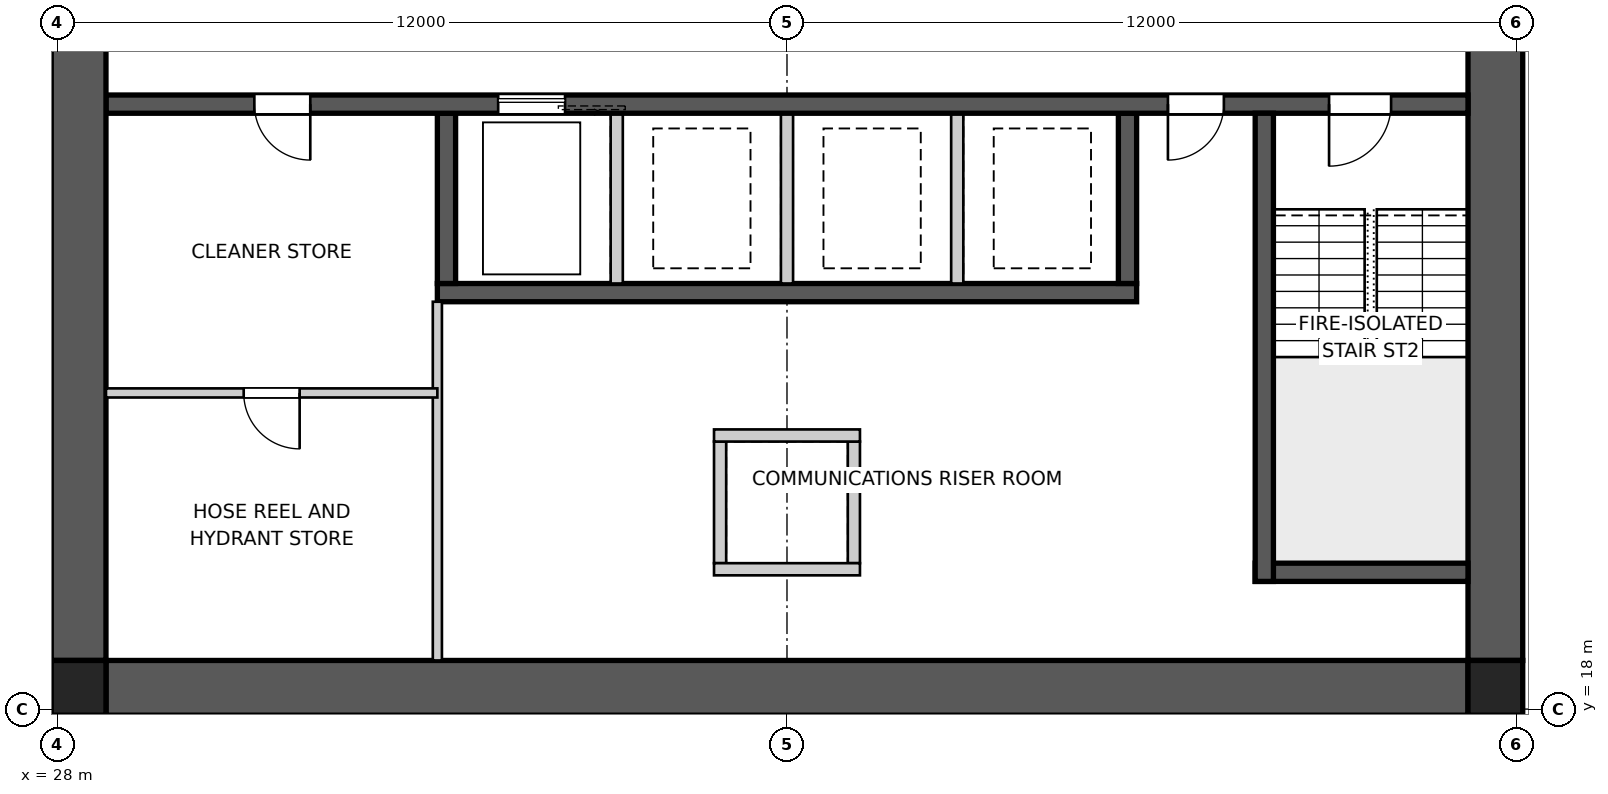
"""IFC4 building model, lengths in metres.
Left out: names, types, materials, properties, quantities, classifications, styles, units other than length and angle.
Written with IfcOpenShell. Run it as: python <this file> out.ifc"""

import sys

from ifc_helpers import new_model, si_unit, direction, frame, frame_2d, origin, origin_2d, place, context, subcontext, project, spatial, polyline, rectangle, outline, extrude, element, fill, save


model = new_model("IFC4")
c1 = context("Model", 3, precision=1e-05, world=origin(), true_north=direction((0.0, 1.0)))
c2 = subcontext(c1, "Body", "Model", "MODEL_VIEW")
j1 = project(units=[si_unit("LENGTHUNIT", "METRE"), si_unit("PLANEANGLEUNIT", "RADIAN")], contexts=[c1])
p1 = place(None, origin())
s1 = spatial("IfcSite", under=j1, at=p1, CompositionType="ELEMENT")
p2 = place(p1, origin())
s2 = spatial("IfcBuilding", under=s1, at=p2, CompositionType="ELEMENT")
p3 = place(p2, frame((0.0, 0.0, 67.6)))
s3 = spatial("IfcBuildingStorey", under=s2, at=p3, CompositionType="ELEMENT", Elevation=67.6)
p4 = place(p3, frame((51.2, 18.35, 0.0), z_axis=(0.0, 0.0, 1.0), x_axis=(-1.0, 0.0, 0.0)))
e1 = element("IfcWall", 1, at=p4, inside=s3, PredefinedType="SHEAR", context=c2, shape_type="SweptSolid", body=[
    extrude(outline(polyline([(0.0, -0.45), (22.4, -0.45), (22.4, -0.025), (22.85, -0.025), (22.85, 0.025), (22.4, 0.025), (22.4, 0.45), (0.0, 0.45), (0.0, 0.025), (-0.45, 0.025), (-0.45, -0.025), (0.0, -0.025), (0.0, -0.45)])), origin(), (0.0, 0.0, 1.0), 3.4),
])
p5 = place(p3, frame((51.65, 18.8, 0.0), z_axis=(0.0, 0.0, 1.0), x_axis=(0.0, 1.0, 0.0)))
e2 = element("IfcWall", 2, at=p5, inside=s3, PredefinedType="SHEAR", context=c2, shape_type="SweptSolid", body=[
    extrude(outline(polyline([(0.0, -0.45), (22.4, -0.45), (22.4, -0.025), (22.85, -0.025), (22.85, 0.025), (22.4, 0.025), (22.4, 0.45), (0.0, 0.45), (0.0, 0.025), (-0.45, 0.025), (-0.45, -0.025), (0.0, -0.025), (0.0, -0.45)])), origin(), (0.0, 0.0, 1.0), 3.4),
])
p6 = place(p5, frame((11.14, 0.0, 0.0)))
e3 = element("IfcOpeningElement", 3, at=p6, cuts=e2, PredefinedType="OPENING", context=c2, shape_type="SweptSolid", body=[
    extrude(rectangle(XDim=1.02, YDim=2.4, at=frame_2d((0.51, 1.2))), frame((0.0, 0.46, 0.0), z_axis=(0.0, -1.0, 0.0), x_axis=(1.0, 0.0, 0.0)), (0.0, 0.0, 1.0), 0.92),
])
p7 = place(p3, frame((28.35, 41.2, 0.0), z_axis=(0.0, 0.0, 1.0), x_axis=(0.0, -1.0, 0.0)))
e4 = element("IfcWall", 4, at=p7, inside=s3, PredefinedType="SHEAR", context=c2, shape_type="SweptSolid", body=[
    extrude(outline(polyline([(0.0, -0.45), (22.4, -0.45), (22.4, -0.025), (22.85, -0.025), (22.85, 0.025), (22.4, 0.025), (22.4, 0.45), (0.0, 0.45), (0.0, 0.025), (-0.45, 0.025), (-0.45, -0.025), (0.0, -0.025), (0.0, -0.45)])), origin(), (0.0, 0.0, 1.0), 3.4),
])
p8 = place(p7, frame((11.14, 0.0, 0.0)))
e5 = element("IfcOpeningElement", 5, at=p8, cuts=e4, PredefinedType="OPENING", context=c2, shape_type="SweptSolid", body=[
    extrude(rectangle(XDim=1.02, YDim=2.4, at=frame_2d((0.51, 1.2))), frame((0.0, 0.46, 0.0), z_axis=(0.0, -1.0, 0.0), x_axis=(1.0, 0.0, 0.0)), (0.0, 0.0, 1.0), 0.92),
])
p9 = place(p3, frame((51.2, 27.95, 0.0), z_axis=(0.0, 0.0, 1.0), x_axis=(-1.0, 0.0, 0.0)))
e6 = element("IfcWall", 6, at=p9, inside=s3, PredefinedType="SHEAR", context=c2, shape_type="SweptSolid", body=[
    extrude(rectangle(XDim=22.4, YDim=0.3, at=frame_2d((11.2, 0.0))), origin(), (0.0, 0.0, 1.0), 3.4),
])
p10 = place(p9, frame((19.04, 0.0, 0.0)))
e7 = element("IfcOpeningElement", 7, at=p10, cuts=e6, PredefinedType="OPENING", context=c2, shape_type="SweptSolid", body=[
    extrude(rectangle(XDim=0.92, YDim=2.1, at=frame_2d((0.46, 1.05))), frame((0.0, 0.16, 0.0), z_axis=(0.0, -1.0, 0.0), x_axis=(1.0, 0.0, 0.0)), (0.0, 0.0, 1.0), 0.32),
])
p11 = place(p9, frame((1.265, 0.0, 0.0)))
e8 = element("IfcOpeningElement", 8, at=p11, cuts=e6, PredefinedType="OPENING", context=c2, shape_type="SweptSolid", body=[
    extrude(rectangle(XDim=1.02, YDim=2.1, at=frame_2d((0.51, 1.05))), frame((0.0, 0.16, 0.0), z_axis=(0.0, -1.0, 0.0), x_axis=(1.0, 0.0, 0.0)), (0.0, 0.0, 1.0), 0.32),
])
p12 = place(p9, frame((4.015, 0.0, 0.0)))
e9 = element("IfcOpeningElement", 9, at=p12, cuts=e6, PredefinedType="OPENING", context=c2, shape_type="SweptSolid", body=[
    extrude(rectangle(XDim=0.92, YDim=2.1, at=frame_2d((0.46, 1.05))), frame((0.0, 0.16, 0.0), z_axis=(0.0, -1.0, 0.0), x_axis=(1.0, 0.0, 0.0)), (0.0, 0.0, 1.0), 0.32),
])
p13 = place(p9, frame((14.85, 0.0, 0.0)))
e10 = element("IfcOpeningElement", 10, at=p13, cuts=e6, PredefinedType="OPENING", context=c2, shape_type="SweptSolid", body=[
    extrude(rectangle(XDim=1.1, YDim=2.1, at=frame_2d((0.55, 1.05))), frame((0.0, 0.16, 0.0), z_axis=(0.0, -1.0, 0.0), x_axis=(1.0, 0.0, 0.0)), (0.0, 0.0, 1.0), 0.32),
])
p14 = place(p3, frame((45.75, 24.85, 0.0), z_axis=(0.0, 0.0, 1.0), x_axis=(-1.0, 0.0, 0.0)))
e11 = element("IfcWall", 11, at=p14, inside=s3, PredefinedType="SHEAR", context=c2, shape_type="SweptSolid", body=[
    extrude(rectangle(XDim=11.5, YDim=0.3, at=frame_2d((5.75, 0.0))), origin(), (0.0, 0.0, 1.0), 3.4),
])
p15 = place(p3, frame((45.6, 27.8, 0.0), z_axis=(0.0, 0.0, 1.0), x_axis=(0.0, -1.0, 0.0)))
e12 = element("IfcWall", 12, at=p15, inside=s3, PredefinedType="SHEAR", context=c2, shape_type="SweptSolid", body=[
    extrude(rectangle(XDim=2.8, YDim=0.3, at=frame_2d((1.4, 0.0))), origin(), (0.0, 0.0, 1.0), 3.4),
])
for number, where, z_axis, x_axis in (
    (13, (42.8, 27.8, 0.0), (0.0, 0.0, 1.0), (0.0, -1.0, 0.0)),
    (14, (40.0, 27.8, 0.0), (0.0, 0.0, 1.0), (0.0, -1.0, 0.0)),
    (15, (37.2, 27.8, 0.0), (0.0, 0.0, 1.0), (0.0, -1.0, 0.0)),
):
    element("IfcWall", number, at=place(p3, frame(where, z_axis=z_axis, x_axis=x_axis)), inside=s3, PredefinedType="SOLIDWALL", context=c2, shape_type="SweptSolid", body=[
        extrude(rectangle(XDim=2.8, YDim=0.2, at=frame_2d((1.4, 0.0))), origin(), (0.0, 0.0, 1.0), 3.4),
    ])
p16 = place(p3, frame((34.4, 27.8, 0.0), z_axis=(0.0, 0.0, 1.0), x_axis=(0.0, -1.0, 0.0)))
e16 = element("IfcWall", 16, at=p16, inside=s3, PredefinedType="SHEAR", context=c2, shape_type="SweptSolid", body=[
    extrude(rectangle(XDim=2.8, YDim=0.3, at=frame_2d((1.4, 0.0))), origin(), (0.0, 0.0, 1.0), 3.4),
])
p17 = place(p3, frame((47.85, 27.8, 0.0), z_axis=(0.0, 0.0, 1.0), x_axis=(0.0, -1.0, 0.0)))
e17 = element("IfcWall", 17, at=p17, inside=s3, PredefinedType="SHEAR", context=c2, shape_type="SweptSolid", body=[
    extrude(rectangle(XDim=7.7, YDim=0.3, at=frame_2d((3.85, 0.0))), origin(), (0.0, 0.0, 1.0), 3.4),
])
p18 = place(p3, frame((51.2, 20.25, 0.0), z_axis=(0.0, 0.0, 1.0), x_axis=(-1.0, 0.0, 0.0)))
e18 = element("IfcWall", 18, at=p18, inside=s3, PredefinedType="SHEAR", context=c2, shape_type="SweptSolid", body=[
    extrude(rectangle(XDim=3.5, YDim=0.3, at=frame_2d((1.75, 0.0))), origin(), (0.0, 0.0, 1.0), 3.4),
])
for number, where, z_axis, x_axis in (
    (19, (38.9, 22.4, 0.0), (0.0, 0.0, 1.0), (0.0, -1.0, 0.0)),
    (20, (41.1, 22.4, 0.0), (0.0, 0.0, 1.0), (0.0, -1.0, 0.0)),
):
    element("IfcWall", number, at=place(p3, frame(where, z_axis=z_axis, x_axis=x_axis)), inside=s3, PredefinedType="SOLIDWALL", context=c2, shape_type="SweptSolid", body=[
        extrude(rectangle(XDim=2.0, YDim=0.2, at=frame_2d((1.0, 0.0))), origin(), (0.0, 0.0, 1.0), 3.4),
    ])
for number, where, z_axis, x_axis in (
    (21, (38.8, 22.5, 0.0), (0.0, 0.0, 1.0), (1.0, 0.0, 0.0)),
    (22, (38.8, 20.3, 0.0), (0.0, 0.0, 1.0), (1.0, 0.0, 0.0)),
):
    element("IfcWall", number, at=place(p3, frame(where, z_axis=z_axis, x_axis=x_axis)), inside=s3, PredefinedType="SOLIDWALL", context=c2, shape_type="SweptSolid", body=[
        extrude(rectangle(XDim=2.4, YDim=0.2, at=frame_2d((1.2, 0.0))), origin(), (0.0, 0.0, 1.0), 3.4),
    ])
for number, where, z_axis, x_axis in (
    (23, (28.35, 18.35, 0.0), (0.0, 0.0, 1.0), (1.0, 0.0, 0.0)),
    (24, (51.65, 18.35, 0.0), (0.0, 0.0, 1.0), (1.0, 0.0, 0.0)),
):
    element("IfcColumn", number, at=place(p3, frame(where, z_axis=z_axis, x_axis=x_axis)), inside=s3, PredefinedType="COLUMN", context=c2, shape_type="SweptSolid", body=[
        extrude(rectangle(XDim=0.9, YDim=0.9, at=origin_2d()), origin(), (0.0, 0.0, 1.0), 3.4),
    ])
p19 = place(p3, frame((34.25, 18.8, 0.0), z_axis=(0.0, 0.0, 1.0), x_axis=(0.0, 1.0, 0.0)))
e25 = element("IfcWall", 25, at=p19, inside=s3, PredefinedType="SOLIDWALL", context=c2, shape_type="SweptSolid", body=[
    extrude(rectangle(XDim=5.9, YDim=0.15, at=frame_2d((2.95, 0.0))), origin(), (0.0, 0.0, 1.0), 3.25),
])
p20 = place(p3, frame((34.25, 23.2, 0.0), z_axis=(0.0, 0.0, 1.0), x_axis=(-1.0, 0.0, 0.0)))
e26 = element("IfcWall", 26, at=p20, inside=s3, PredefinedType="SOLIDWALL", context=c2, shape_type="SweptSolid", body=[
    extrude(rectangle(XDim=5.45, YDim=0.15, at=frame_2d((2.725, 0.0))), origin(), (0.0, 0.0, 1.0), 3.25),
])
p21 = place(p20, frame((2.265, 0.0, 0.0)))
e27 = element("IfcOpeningElement", 27, at=p21, cuts=e26, PredefinedType="OPENING", context=c2, shape_type="SweptSolid", body=[
    extrude(rectangle(XDim=0.92, YDim=2.1, at=frame_2d((0.46, 1.05))), frame((0.0, 0.085, 0.0), z_axis=(0.0, -1.0, 0.0), x_axis=(1.0, 0.0, 0.0)), (0.0, 0.0, 1.0), 0.17),
])
p22 = place(p10, origin())
e28 = element("IfcDoor", 28, at=p22, inside=s3, OperationType="SINGLE_SWING_LEFT", PredefinedType="DOOR", context=c2, shape_type="SweptSolid", body=[
    extrude(rectangle(XDim=0.92, YDim=2.1, at=frame_2d((0.46, 1.05))), frame((0.0, 0.025, 0.0), z_axis=(0.0, -1.0, 0.0), x_axis=(1.0, 0.0, 0.0)), (0.0, 0.0, 1.0), 0.05),
])
fill(e7, e28)
p23 = place(p11, origin())
e29 = element("IfcDoor", 29, at=p23, inside=s3, OperationType="SINGLE_SWING_RIGHT", PredefinedType="DOOR", context=c2, shape_type="SweptSolid", body=[
    extrude(rectangle(XDim=1.02, YDim=2.1, at=frame_2d((0.51, 1.05))), frame((0.0, 0.025, 0.0), z_axis=(0.0, -1.0, 0.0), x_axis=(1.0, 0.0, 0.0)), (0.0, 0.0, 1.0), 0.05),
])
fill(e8, e29)
p24 = place(p12, origin())
e30 = element("IfcDoor", 30, at=p24, inside=s3, OperationType="SINGLE_SWING_RIGHT", PredefinedType="DOOR", context=c2, shape_type="SweptSolid", body=[
    extrude(rectangle(XDim=0.92, YDim=2.1, at=frame_2d((0.46, 1.05))), frame((0.0, 0.025, 0.0), z_axis=(0.0, -1.0, 0.0), x_axis=(1.0, 0.0, 0.0)), (0.0, 0.0, 1.0), 0.05),
])
fill(e9, e30)
p25 = place(p21, origin())
e31 = element("IfcDoor", 31, at=p25, inside=s3, OperationType="SINGLE_SWING_LEFT", PredefinedType="DOOR", context=c2, shape_type="SweptSolid", body=[
    extrude(rectangle(XDim=0.92, YDim=2.1, at=frame_2d((0.46, 1.05))), frame((0.0, 0.025, 0.0), z_axis=(0.0, -1.0, 0.0), x_axis=(1.0, 0.0, 0.0)), (0.0, 0.0, 1.0), 0.05),
])
fill(e27, e31)
p26 = place(p13, origin())
e32 = element("IfcDoor", 32, at=p26, inside=s3, OperationType="SLIDING_TO_LEFT", PredefinedType="DOOR", context=c2, shape_type="SweptSolid", body=[
    extrude(rectangle(XDim=1.1, YDim=2.1, at=frame_2d((0.55, 1.05))), frame((0.0, 0.025, 0.0), z_axis=(0.0, -1.0, 0.0), x_axis=(1.0, 0.0, 0.0)), (0.0, 0.0, 1.0), 0.05),
])
fill(e10, e32)
save(model, sys.argv[1])
